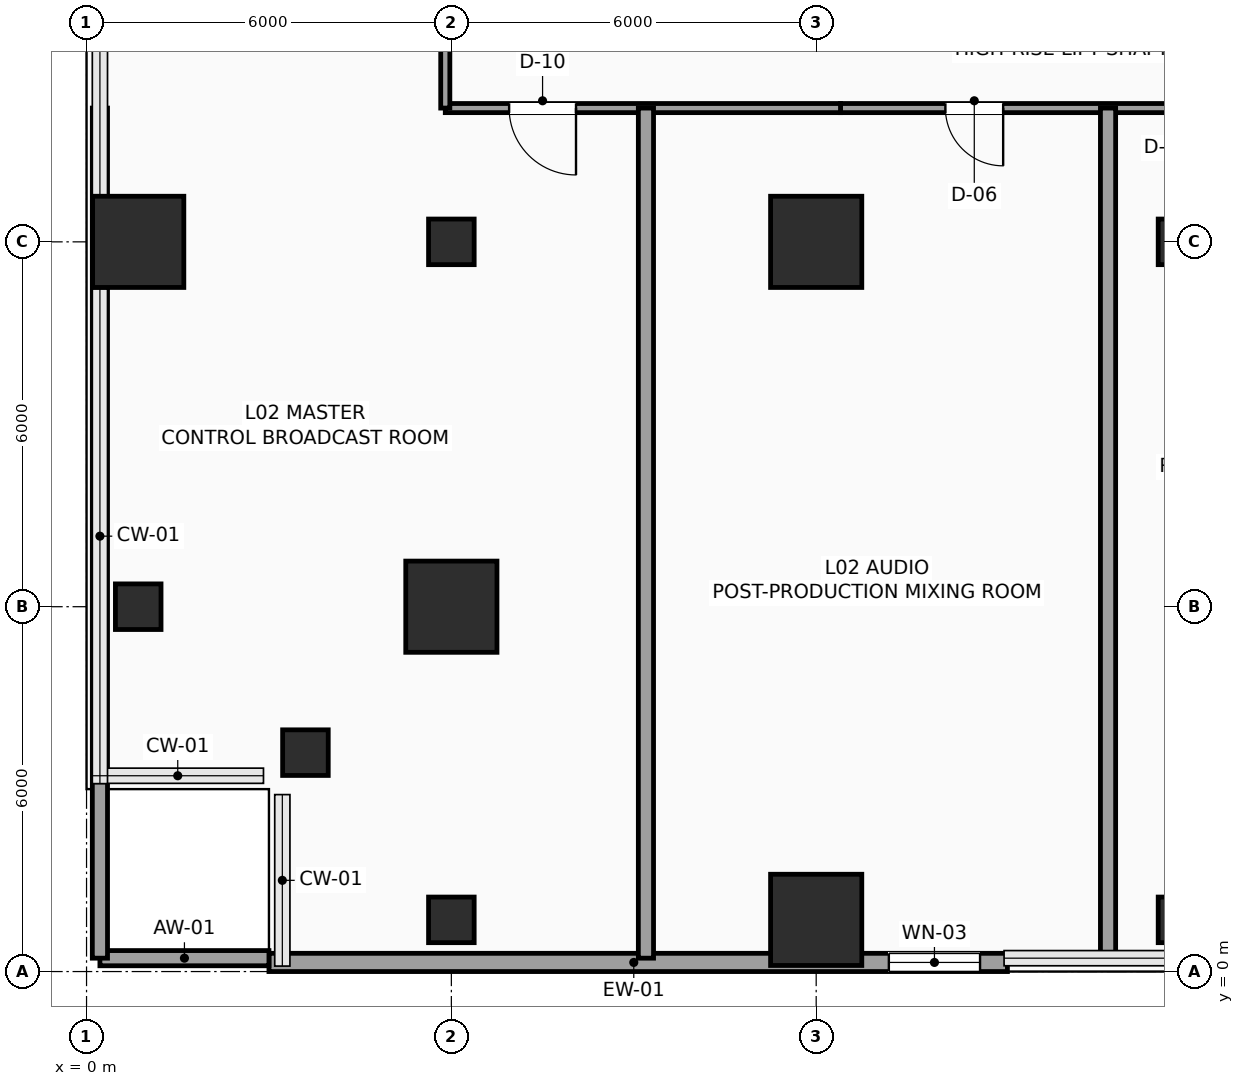
"""IFC4 building model, lengths in metres.
Left out: names, types, materials, properties, quantities, classifications, styles, units other than length and angle.
Written with IfcOpenShell. Run it as: python <this file> out.ifc"""

import sys

from ifc_helpers import new_model, si_unit, direction, frame, frame_2d, origin, origin_2d, place, context, subcontext, project, spatial, rectangle, hollow_rectangle, extrude, element, fill, save


model = new_model("IFC4")
c1 = context("Model", 3, precision=1e-05, world=origin(), true_north=direction((0.0, 1.0)))
c2 = subcontext(c1, "Body", "Model", "MODEL_VIEW")
j1 = project(units=[si_unit("LENGTHUNIT", "METRE"), si_unit("PLANEANGLEUNIT", "RADIAN")], contexts=[c1])
p1 = place(None, origin())
s1 = spatial("IfcSite", under=j1, at=p1, CompositionType="ELEMENT")
p2 = place(p1, origin())
s2 = spatial("IfcBuilding", under=s1, at=p2, CompositionType="ELEMENT")
p3 = place(p2, frame((0.0, 0.0, 11.1)))
s3 = spatial("IfcBuildingStorey", under=s2, at=p3, CompositionType="ELEMENT", Elevation=11.1)
for number, where, z_axis, x_axis in (
    (1, (3.6, 3.6, 0.0), (0.0, 0.0, 1.0), (1.0, 0.0, 0.0)),
    (2, (0.85, 6.0, 0.0), (0.0, 0.0, 1.0), (1.0, 0.0, 0.0)),
):
    element("IfcColumn", number, at=place(p3, frame(where, z_axis=z_axis, x_axis=x_axis)), inside=s3, PredefinedType="COLUMN", context=c2, shape_type="SweptSolid", body=[
        extrude(hollow_rectangle(XDim=0.75, YDim=0.75, WallThickness=0.035, InnerFilletRadius=0.035, OuterFilletRadius=0.05, at=origin_2d()), origin(), (0.0, 0.0, 1.0), 5.4),
    ])
p4 = place(p3, frame((0.85, 12.0, 0.0), z_axis=(0.0, 0.0, 1.0), x_axis=(1.0, 0.0, 0.0)))
e3 = element("IfcColumn", 3, at=p4, inside=s3, PredefinedType="COLUMN", context=c2, shape_type="SweptSolid", body=[
    extrude(rectangle(XDim=1.5, YDim=1.5, at=origin_2d()), origin(), (0.0, 0.0, 1.0), 5.4),
])
p5 = place(p3, frame((6.0, 0.85, 0.0), z_axis=(0.0, 0.0, 1.0), x_axis=(1.0, 0.0, 0.0)))
e4 = element("IfcColumn", 4, at=p5, inside=s3, PredefinedType="COLUMN", context=c2, shape_type="SweptSolid", body=[
    extrude(hollow_rectangle(XDim=0.75, YDim=0.75, WallThickness=0.035, InnerFilletRadius=0.035, OuterFilletRadius=0.05, at=origin_2d()), origin(), (0.0, 0.0, 1.0), 5.4),
])
p6 = place(p3, frame((6.0, 6.0, 0.0), z_axis=(0.0, 0.0, 1.0), x_axis=(1.0, 0.0, 0.0)))
e5 = element("IfcColumn", 5, at=p6, inside=s3, PredefinedType="COLUMN", context=c2, shape_type="SweptSolid", body=[
    extrude(rectangle(XDim=1.5, YDim=1.5, at=origin_2d()), origin(), (0.0, 0.0, 1.0), 5.4),
])
p7 = place(p3, frame((6.0, 12.0, 0.0), z_axis=(0.0, 0.0, 1.0), x_axis=(1.0, 0.0, 0.0)))
e6 = element("IfcColumn", 6, at=p7, inside=s3, PredefinedType="COLUMN", context=c2, shape_type="SweptSolid", body=[
    extrude(hollow_rectangle(XDim=0.75, YDim=0.75, WallThickness=0.035, InnerFilletRadius=0.035, OuterFilletRadius=0.05, at=origin_2d()), origin(), (0.0, 0.0, 1.0), 5.4),
])
for number, where, z_axis, x_axis in (
    (7, (12.0, 0.85, 0.0), (0.0, 0.0, 1.0), (1.0, 0.0, 0.0)),
    (8, (12.0, 12.0, 0.0), (0.0, 0.0, 1.0), (1.0, 0.0, 0.0)),
):
    element("IfcColumn", number, at=place(p3, frame(where, z_axis=z_axis, x_axis=x_axis)), inside=s3, PredefinedType="COLUMN", context=c2, shape_type="SweptSolid", body=[
        extrude(rectangle(XDim=1.5, YDim=1.5, at=origin_2d()), origin(), (0.0, 0.0, 1.0), 5.4),
    ])
for number, where, z_axis, x_axis in (
    (9, (18.0, 0.85, 0.0), (0.0, 0.0, 1.0), (1.0, 0.0, 0.0)),
    (10, (18.0, 12.0, 0.0), (0.0, 0.0, 1.0), (1.0, 0.0, 0.0)),
):
    element("IfcColumn", number, at=place(p3, frame(where, z_axis=z_axis, x_axis=x_axis)), inside=s3, PredefinedType="COLUMN", context=c2, shape_type="SweptSolid", body=[
        extrude(hollow_rectangle(XDim=0.75, YDim=0.75, WallThickness=0.035, InnerFilletRadius=0.035, OuterFilletRadius=0.05, at=origin_2d()), origin(), (0.0, 0.0, 1.0), 5.4),
    ])
p8 = place(p3, frame((15.145, 0.15, 0.0), z_axis=(0.0, 0.0, 1.0), x_axis=(-1.0, 0.0, 0.0)))
e11 = element("IfcWall", 11, at=p8, inside=s3, PredefinedType="SOLIDWALL", context=c2, shape_type="SweptSolid", body=[
    extrude(rectangle(XDim=12.145, YDim=0.3, at=frame_2d((6.073, 0.0))), origin(), (0.0, 0.0, 1.0), 5.1),
])
p9 = place(p8, frame((0.45, 0.0, 1.0)))
e12 = element("IfcOpeningElement", 12, at=p9, cuts=e11, PredefinedType="OPENING", context=c2, shape_type="SweptSolid", body=[
    extrude(rectangle(XDim=1.5, YDim=1.8, at=frame_2d((0.75, 0.9))), frame((0.0, 0.16, 0.0), z_axis=(0.0, -1.0, 0.0), x_axis=(1.0, 0.0, 0.0)), (0.0, 0.0, 1.0), 0.32),
])
p10 = place(p3, frame((21.55, 14.2, 0.0), z_axis=(0.0, 0.0, 1.0), x_axis=(-1.0, 0.0, 0.0)))
e13 = element("IfcWall", 13, at=p10, inside=s3, PredefinedType="PARTITIONING", context=c2, shape_type="SweptSolid", body=[
    extrude(rectangle(XDim=9.15, YDim=0.15, at=frame_2d((4.575, 0.0))), origin(), (0.0, 0.0, 1.0), 5.1),
])
p11 = place(p10, frame((6.475, 0.0, 0.0)))
e14 = element("IfcOpeningElement", 14, at=p11, cuts=e13, PredefinedType="OPENING", context=c2, shape_type="SweptSolid", body=[
    extrude(rectangle(XDim=0.95, YDim=2.15, at=frame_2d((0.475, 1.075))), frame((0.0, 0.085, 0.0), z_axis=(0.0, -1.0, 0.0), x_axis=(1.0, 0.0, 0.0)), (0.0, 0.0, 1.0), 0.17),
])
p12 = place(p10, frame((1.875, 0.0, 0.0)))
e15 = element("IfcOpeningElement", 15, at=p12, cuts=e13, PredefinedType="OPENING", context=c2, shape_type="SweptSolid", body=[
    extrude(rectangle(XDim=1.1, YDim=2.25, at=frame_2d((0.55, 1.125))), frame((0.0, 0.085, 0.0), z_axis=(0.0, -1.0, 0.0), x_axis=(1.0, 0.0, 0.0)), (0.0, 0.0, 1.0), 0.17),
])
p13 = place(p3, frame((12.4, 14.2, 0.0), z_axis=(0.0, 0.0, 1.0), x_axis=(-1.0, 0.0, 0.0)))
e16 = element("IfcWall", 16, at=p13, inside=s3, PredefinedType="PARTITIONING", context=c2, shape_type="SweptSolid", body=[
    extrude(rectangle(XDim=6.5, YDim=0.15, at=frame_2d((3.25, 0.0))), origin(), (0.0, 0.0, 1.0), 5.1),
])
p14 = place(p13, frame((4.35, 0.0, 0.0)))
e17 = element("IfcOpeningElement", 17, at=p14, cuts=e16, PredefinedType="OPENING", context=c2, shape_type="SweptSolid", body=[
    extrude(rectangle(XDim=1.1, YDim=2.25, at=frame_2d((0.55, 1.125))), frame((0.0, 0.085, 0.0), z_axis=(0.0, -1.0, 0.0), x_axis=(1.0, 0.0, 0.0)), (0.0, 0.0, 1.0), 0.17),
])
p15 = place(p3, frame((5.9, 14.2, 0.0), z_axis=(0.0, 0.0, 1.0), x_axis=(0.0, 1.0, 0.0)))
e18 = element("IfcWall", 18, at=p15, inside=s3, PredefinedType="PARTITIONING", context=c2, shape_type="SweptSolid", body=[
    extrude(rectangle(XDim=2.35, YDim=0.15, at=frame_2d((1.175, 0.0))), origin(), (0.0, 0.0, 1.0), 4.442),
])
p16 = place(p3, frame((0.22, 0.22, 0.0), z_axis=(0.0, 0.0, 1.0), x_axis=(1.0, 0.0, 0.0)))
e19 = element("IfcWall", 19, at=p16, inside=s3, PredefinedType="PARTITIONING", context=c2, shape_type="SweptSolid", body=[
    extrude(rectangle(XDim=2.78, YDim=0.25, at=frame_2d((1.39, 0.0))), origin(), (0.0, 0.0, 1.0), 5.1),
])
for number, where, z_axis, x_axis in (
    (20, (0.22, 0.22, 0.0), (0.0, 0.0, 1.0), (0.0, 1.0, 0.0)),
    (21, (9.2, 0.22, 0.0), (0.0, 0.0, 1.0), (0.0, 1.0, 0.0)),
    (22, (16.8, 0.22, 0.0), (0.0, 0.0, 1.0), (0.0, 1.0, 0.0)),
):
    element("IfcWall", number, at=place(p3, frame(where, z_axis=z_axis, x_axis=x_axis)), inside=s3, PredefinedType="PARTITIONING", context=c2, shape_type="SweptSolid", body=[
        extrude(rectangle(XDim=13.98, YDim=0.25, at=frame_2d((6.99, 0.0))), origin(), (0.0, 0.0, 1.0), 5.1),
    ])
p17 = place(p9, origin())
e23 = element("IfcWindow", 23, at=p17, inside=s3, PartitioningType="SINGLE_PANEL", PredefinedType="WINDOW", context=c2, shape_type="SweptSolid", body=[
    extrude(rectangle(XDim=1.5, YDim=1.8, at=frame_2d((0.75, 0.9))), frame((0.0, 0.03, 0.0), z_axis=(0.0, -1.0, 0.0), x_axis=(1.0, 0.0, 0.0)), (0.0, 0.0, 1.0), 0.06),
])
fill(e12, e23)
p18 = place(p11, origin())
e24 = element("IfcDoor", 24, at=p18, inside=s3, OperationType="SINGLE_SWING_LEFT", PredefinedType="DOOR", context=c2, shape_type="SweptSolid", body=[
    extrude(rectangle(XDim=0.95, YDim=2.15, at=frame_2d((0.475, 1.075))), frame((0.0, 0.025, 0.0), z_axis=(0.0, -1.0, 0.0), x_axis=(1.0, 0.0, 0.0)), (0.0, 0.0, 1.0), 0.05),
])
fill(e14, e24)
p19 = place(p14, origin())
e25 = element("IfcDoor", 25, at=p19, inside=s3, OperationType="SINGLE_SWING_LEFT", PredefinedType="DOOR", context=c2, shape_type="SweptSolid", body=[
    extrude(rectangle(XDim=1.1, YDim=2.25, at=frame_2d((0.55, 1.125))), frame((0.0, 0.025, 0.0), z_axis=(0.0, -1.0, 0.0), x_axis=(1.0, 0.0, 0.0)), (0.0, 0.0, 1.0), 0.05),
])
fill(e17, e25)
save(model, sys.argv[1])
